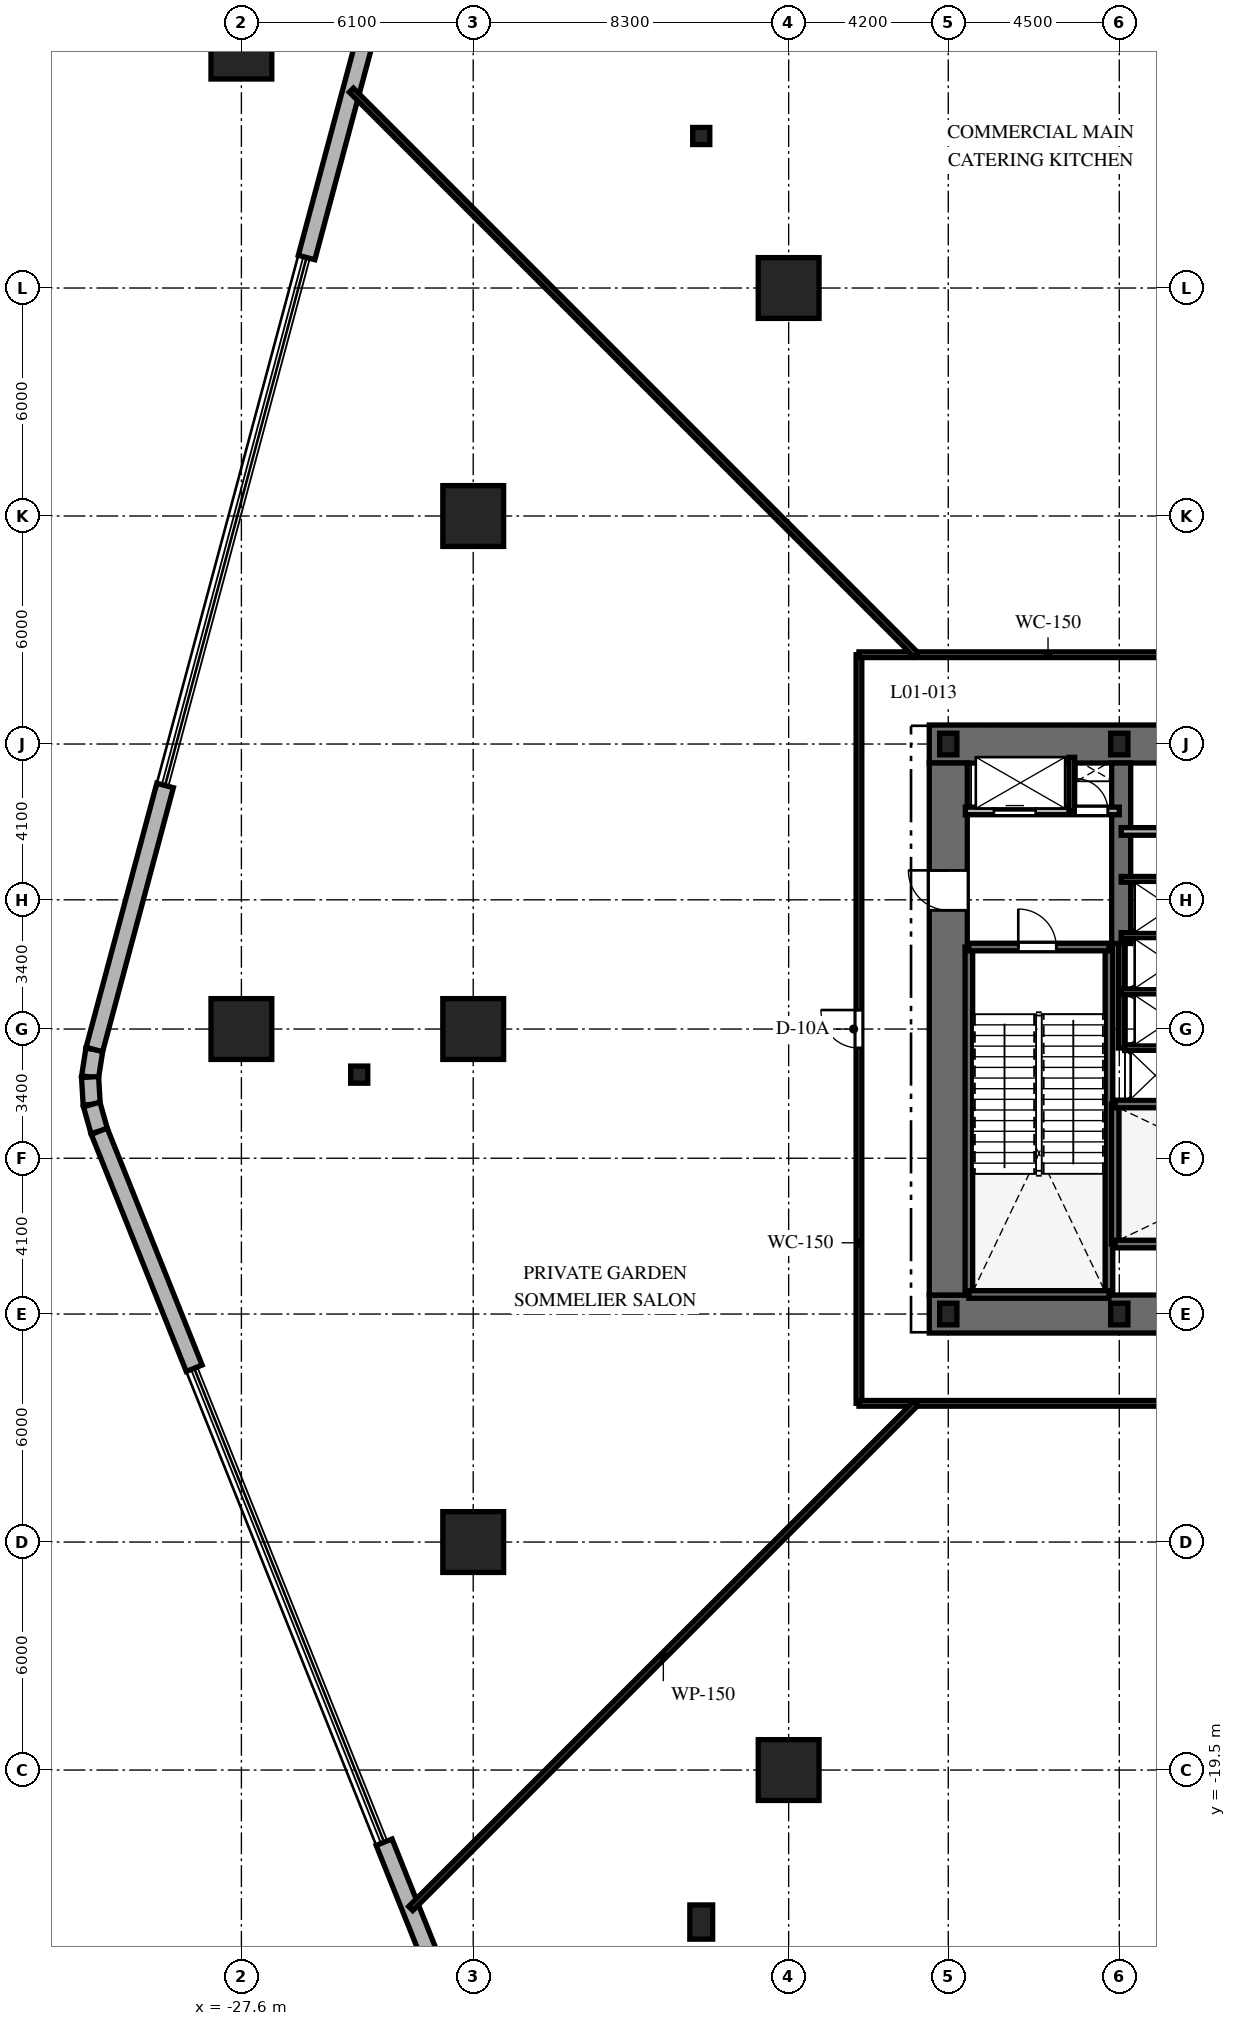
"""IFC4 building model, lengths in metres.
Left out: names, types, materials, properties, quantities, classifications, styles, units other than length and angle.
Written with IfcOpenShell. Run it as: python <this file> out.ifc"""

import sys

from ifc_helpers import new_model, si_unit, direction, frame, frame_2d, origin, origin_2d, place, context, subcontext, project, spatial, rectangle, i_section, extrude, element, fill, save


model = new_model("IFC4")
c1 = context("Model", 3, precision=1e-05, world=origin(), true_north=direction((0.0, 1.0)))
c2 = subcontext(c1, "Body", "Model", "MODEL_VIEW")
j1 = project(units=[si_unit("LENGTHUNIT", "METRE"), si_unit("PLANEANGLEUNIT", "RADIAN")], contexts=[c1])
p1 = place(None, origin())
s1 = spatial("IfcSite", under=j1, at=p1, CompositionType="ELEMENT")
p2 = place(p1, origin())
s2 = spatial("IfcBuilding", under=s1, at=p2, CompositionType="ELEMENT")
p3 = place(p2, frame((0.0, 0.0, 6.0)))
s3 = spatial("IfcBuildingStorey", under=s2, at=p3, CompositionType="ELEMENT", Elevation=6.0)
p4 = place(p3, frame((-9.5, -7.5, 0.0), z_axis=(0.0, 0.0, 1.0), x_axis=(1.0, 0.0, 0.0)))
e1 = element("IfcWall", 1, at=p4, inside=s3, PredefinedType="SHEAR", context=c2, shape_type="SweptSolid", body=[
    extrude(rectangle(XDim=19.0, YDim=1.0, at=frame_2d((9.5, 0.0))), origin(), (0.0, 0.0, 1.0), 5.4),
])
p5 = place(p4, frame((9.55, 0.0, 0.0)))
e2 = element("IfcOpeningElement", 2, at=p5, cuts=e1, PredefinedType="OPENING", context=c2, shape_type="SweptSolid", body=[
    extrude(rectangle(XDim=1.0, YDim=2.15, at=frame_2d((0.5, 1.075))), frame((0.0, 0.51, 0.0), z_axis=(0.0, -1.0, 0.0), x_axis=(1.0, 0.0, 0.0)), (0.0, 0.0, 1.0), 1.02),
])
p6 = place(p3, frame((-9.5, 7.5, 0.0), z_axis=(0.0, 0.0, 1.0), x_axis=(1.0, 0.0, 0.0)))
e3 = element("IfcWall", 3, at=p6, inside=s3, PredefinedType="SHEAR", context=c2, shape_type="SweptSolid", body=[
    extrude(rectangle(XDim=9.55, YDim=1.0, at=frame_2d((4.775, 0.0))), origin(), (0.0, 0.0, 1.0), 5.4),
])
p7 = place(p3, frame((-9.0, -7.0, 0.0), z_axis=(0.0, 0.0, 1.0), x_axis=(0.0, 1.0, 0.0)))
e4 = element("IfcWall", 4, at=p7, inside=s3, PredefinedType="SHEAR", context=c2, shape_type="SweptSolid", body=[
    extrude(rectangle(XDim=14.0, YDim=1.0, at=frame_2d((7.0, 0.0))), origin(), (0.0, 0.0, 1.0), 5.4),
])
p8 = place(p7, frame((10.125, 0.0, 0.0)))
e5 = element("IfcOpeningElement", 5, at=p8, cuts=e4, PredefinedType="OPENING", context=c2, shape_type="SweptSolid", body=[
    extrude(rectangle(XDim=1.05, YDim=2.15, at=frame_2d((0.525, 1.075))), frame((0.0, 0.51, 0.0), z_axis=(0.0, -1.0, 0.0), x_axis=(1.0, 0.0, 0.0)), (0.0, 0.0, 1.0), 1.02),
])
p9 = place(p3, frame((-4.45, 2.25, 0.0), z_axis=(0.0, 0.0, 1.0), x_axis=(0.0, 1.0, 0.0)))
e6 = element("IfcWall", 6, at=p9, inside=s3, PredefinedType="SHEAR", context=c2, shape_type="SweptSolid", body=[
    extrude(rectangle(XDim=4.75, YDim=0.5, at=frame_2d((2.375, 0.0))), origin(), (0.0, 0.0, 1.0), 5.4),
])
for number, where, z_axis, x_axis in (
    (7, (-8.458, -6.985, 0.0), (0.0, 0.0, 1.0), (0.0, 1.0, 0.0)),
    (8, (-4.772, -6.985, 0.0), (0.0, 0.0, 1.0), (0.0, 1.0, 0.0)),
):
    element("IfcWall", number, at=place(p3, frame(where, z_axis=z_axis, x_axis=x_axis)), inside=s3, PredefinedType="SHEAR", context=c2, shape_type="SweptSolid", body=[
        extrude(rectangle(XDim=9.143, YDim=0.2, at=frame_2d((4.572, 0.0))), origin(), (0.0, 0.0, 1.0), 5.4),
    ])
p10 = place(p3, frame((-8.458, -6.985, 0.0), z_axis=(0.0, 0.0, 1.0), x_axis=(1.0, 0.0, 0.0)))
e9 = element("IfcWall", 9, at=p10, inside=s3, PredefinedType="SHEAR", context=c2, shape_type="SweptSolid", body=[
    extrude(rectangle(XDim=3.686, YDim=0.2, at=frame_2d((1.843, 0.0))), origin(), (0.0, 0.0, 1.0), 5.4),
])
p11 = place(p3, frame((-8.458, 2.158, 0.0), z_axis=(0.0, 0.0, 1.0), x_axis=(1.0, 0.0, 0.0)))
e10 = element("IfcWall", 10, at=p11, inside=s3, PredefinedType="SHEAR", context=c2, shape_type="SweptSolid", body=[
    extrude(rectangle(XDim=3.686, YDim=0.2, at=frame_2d((1.843, 0.0))), origin(), (0.0, 0.0, 1.0), 5.4),
])
p12 = place(p11, frame((1.3, 0.0, 0.0)))
e11 = element("IfcOpeningElement", 11, at=p12, cuts=e10, PredefinedType="OPENING", context=c2, shape_type="SweptSolid", body=[
    extrude(rectangle(XDim=1.0, YDim=2.15, at=frame_2d((0.5, 1.075))), frame((0.0, 0.11, 0.0), z_axis=(0.0, -1.0, 0.0), x_axis=(1.0, 0.0, 0.0)), (0.0, 0.0, 1.0), 0.22),
])
p13 = place(p3, frame((-4.608, -5.658, 0.0), z_axis=(0.0, 0.0, 1.0), x_axis=(0.0, 1.0, 0.0)))
e12 = element("IfcWall", 12, at=p13, inside=s3, PredefinedType="SHEAR", context=c2, shape_type="SweptSolid", body=[
    extrude(rectangle(XDim=3.686, YDim=0.2, at=frame_2d((1.843, 0.0))), origin(), (0.0, 0.0, 1.0), 5.4),
])
p14 = place(p3, frame((-4.608, -5.658, 0.0), z_axis=(0.0, 0.0, 1.0), x_axis=(1.0, 0.0, 0.0)))
e13 = element("IfcWall", 13, at=p14, inside=s3, PredefinedType="SHEAR", context=c2, shape_type="SweptSolid", body=[
    extrude(rectangle(XDim=9.166, YDim=0.2, at=frame_2d((4.583, 0.0))), origin(), (0.0, 0.0, 1.0), 5.4),
])
p15 = place(p14, frame((7.45, 0.0, 0.0)))
e14 = element("IfcOpeningElement", 14, at=p15, cuts=e13, PredefinedType="OPENING", context=c2, shape_type="SweptSolid", body=[
    extrude(rectangle(XDim=1.0, YDim=2.15, at=frame_2d((0.5, 1.075))), frame((0.0, 0.11, 0.0), z_axis=(0.0, -1.0, 0.0), x_axis=(1.0, 0.0, 0.0)), (0.0, 0.0, 1.0), 0.22),
])
p16 = place(p3, frame((-4.608, -1.972, 0.0), z_axis=(0.0, 0.0, 1.0), x_axis=(1.0, 0.0, 0.0)))
e15 = element("IfcWall", 15, at=p16, inside=s3, PredefinedType="SHEAR", context=c2, shape_type="SweptSolid", body=[
    extrude(rectangle(XDim=9.166, YDim=0.2, at=frame_2d((4.583, 0.0))), origin(), (0.0, 0.0, 1.0), 5.4),
])
for number, where, z_axis, x_axis in (
    (16, (-9.0, -7.5, 0.0), (0.0, 0.0, 1.0), (1.0, 0.0, 0.0)),
    (17, (-4.5, -7.5, 0.0), (0.0, 0.0, 1.0), (1.0, 0.0, 0.0)),
    (18, (-4.5, 7.5, 0.0), (0.0, 0.0, 1.0), (1.0, 0.0, 0.0)),
    (19, (-9.0, 7.5, 0.0), (0.0, 0.0, 1.0), (1.0, 0.0, 0.0)),
):
    element("IfcColumn", number, at=place(p3, frame(where, z_axis=z_axis, x_axis=x_axis)), inside=s3, PredefinedType="COLUMN", context=c2, shape_type="SweptSolid", body=[
        extrude(i_section(OverallWidth=0.454, OverallDepth=0.569, WebThickness=0.078, FlangeThickness=0.125, at=origin_2d()), origin(), (0.0, 0.0, 1.0), 5.4),
    ])
for number, where, z_axis, x_axis in (
    (20, (-21.5, -13.5, 0.0), (0.0, 0.0, 1.0), (1.0, 0.0, 0.0)),
    (21, (-21.5, 0.0, 0.0), (0.0, 0.0, 1.0), (1.0, 0.0, 0.0)),
    (22, (-21.5, 13.5, 0.0), (0.0, 0.0, 1.0), (1.0, 0.0, 0.0)),
    (23, (-13.2, -19.5, 0.0), (0.0, 0.0, 1.0), (1.0, 0.0, 0.0)),
    (24, (-13.2, 19.5, 0.0), (0.0, 0.0, 1.0), (1.0, 0.0, 0.0)),
    (25, (-27.6, 25.8, 0.0), (0.0, 0.0, 1.0), (1.0, 0.0, 0.0)),
    (26, (-27.6, 0.0, 0.0), (0.0, 0.0, 1.0), (1.0, 0.0, 0.0)),
):
    element("IfcColumn", number, at=place(p3, frame(where, z_axis=z_axis, x_axis=x_axis)), inside=s3, PredefinedType="COLUMN", context=c2, shape_type="SweptSolid", body=[
        extrude(rectangle(XDim=1.6, YDim=1.6, at=origin_2d()), origin(), (0.0, 0.0, 1.0), 5.4),
    ])
p17 = place(p3, frame((-15.5, -23.5, 0.0), z_axis=(0.0, 0.0, 1.0), x_axis=(1.0, 0.0, 0.0)))
e27 = element("IfcColumn", 27, at=p17, inside=s3, PredefinedType="PILASTER", context=c2, shape_type="SweptSolid", body=[
    extrude(rectangle(XDim=0.6, YDim=0.9, at=origin_2d()), origin(), (0.0, 0.0, 1.0), 5.4),
])
for number, where, z_axis, x_axis in (
    (28, (-15.5, 23.5, 0.0), (0.0, 0.0, 1.0), (1.0, 0.0, 0.0)),
    (29, (-24.5, -1.2, 0.0), (0.0, 0.0, 1.0), (1.0, 0.0, 0.0)),
):
    element("IfcColumn", number, at=place(p3, frame(where, z_axis=z_axis, x_axis=x_axis)), inside=s3, PredefinedType="PILASTER", context=c2, shape_type="SweptSolid", body=[
        extrude(rectangle(XDim=0.45, YDim=0.45, at=origin_2d()), origin(), (0.0, 0.0, 1.0), 5.4),
    ])
p18 = place(p3, frame((-31.469, -0.539, 0.0), z_axis=(0.0, 0.0, 1.0), x_axis=(-0.154082468729, -0.988057990621, 0.0)))
e30 = element("IfcWall", 30, at=p18, inside=s3, PredefinedType="SOLIDWALL", context=c2, shape_type="SweptSolid", body=[
    extrude(rectangle(XDim=0.734, YDim=0.45, at=frame_2d((0.367, 0.0))), origin(), (0.0, 0.0, 1.0), 4.05),
])
p19 = place(p3, frame((-31.582, -1.264, 0.0), z_axis=(0.0, 0.0, 1.0), x_axis=(0.059555119752, -0.998225018576, 0.0)))
e31 = element("IfcWall", 31, at=p19, inside=s3, PredefinedType="SOLIDWALL", context=c2, shape_type="SweptSolid", body=[
    extrude(rectangle(XDim=0.721, YDim=0.45, at=frame_2d((0.361, 0.0))), origin(), (0.0, 0.0, 1.0), 4.05),
])
p20 = place(p3, frame((-31.539, -1.984, 0.0), z_axis=(0.0, 0.0, 1.0), x_axis=(0.270543197703, -0.962707836354, 0.0)))
e32 = element("IfcWall", 32, at=p20, inside=s3, PredefinedType="SOLIDWALL", context=c2, shape_type="SweptSolid", body=[
    extrude(rectangle(XDim=0.734, YDim=0.45, at=frame_2d((0.367, 0.0))), origin(), (0.0, 0.0, 1.0), 4.05),
])
p21 = place(p3, frame((-24.024, 27.25, 0.0), z_axis=(0.0, 0.0, 1.0), x_axis=(-0.25880339056, -0.965930020775, 0.0)))
e33 = element("IfcWall", 33, at=p21, inside=s3, PredefinedType="SOLIDWALL", context=c2, shape_type="SweptSolid", body=[
    extrude(rectangle(XDim=7.192, YDim=0.45, at=frame_2d((3.596, 0.0))), origin(), (0.0, 0.0, 1.0), 4.05),
])
p22 = place(p3, frame((-29.608, 6.409, 0.0), z_axis=(0.0, 0.0, 1.0), x_axis=(-0.258786419646, -0.965934567663, 0.0)))
e34 = element("IfcWall", 34, at=p22, inside=s3, PredefinedType="SOLIDWALL", context=c2, shape_type="SweptSolid", body=[
    extrude(rectangle(XDim=7.193, YDim=0.45, at=frame_2d((3.596, 0.0))), origin(), (0.0, 0.0, 1.0), 4.05),
])
p23 = place(p3, frame((-31.341, -2.69, 0.0), z_axis=(0.0, 0.0, 1.0), x_axis=(0.371948252928, -0.928253466002, 0.0)))
e35 = element("IfcWall", 35, at=p23, inside=s3, PredefinedType="SOLIDWALL", context=c2, shape_type="SweptSolid", body=[
    extrude(rectangle(XDim=6.718, YDim=0.45, at=frame_2d((3.359, 0.0))), origin(), (0.0, 0.0, 1.0), 4.05),
])
p24 = place(p3, frame((-23.844, -21.398, 0.0), z_axis=(0.0, 0.0, 1.0), x_axis=(0.37196701808, -0.928245946644, 0.0)))
e36 = element("IfcWall", 36, at=p24, inside=s3, PredefinedType="SOLIDWALL", context=c2, shape_type="SweptSolid", body=[
    extrude(rectangle(XDim=6.719, YDim=0.45, at=frame_2d((3.359, 0.0))), origin(), (0.0, 0.0, 1.0), 4.05),
])
p25 = place(p3, frame((-8.55, 5.74, 0.0), z_axis=(0.0, 0.0, 1.0), x_axis=(1.0, 0.0, 0.0)))
e37 = element("IfcWall", 37, at=p25, inside=s3, PredefinedType="PARTITIONING", context=c2, shape_type="SweptSolid", body=[
    extrude(rectangle(XDim=4.05, YDim=0.2, at=frame_2d((2.025, 0.0))), origin(), (0.0, 0.0, 1.0), 5.08),
])
p26 = place(p25, frame((0.75, 0.0, 0.0)))
e38 = element("IfcOpeningElement", 38, at=p26, cuts=e37, PredefinedType="OPENING", context=c2, shape_type="SweptSolid", body=[
    extrude(rectangle(XDim=1.1, YDim=2.2, at=frame_2d((0.55, 1.1))), frame((0.0, 0.11, 0.0), z_axis=(0.0, -1.0, 0.0), x_axis=(1.0, 0.0, 0.0)), (0.0, 0.0, 1.0), 0.22),
])
p27 = place(p25, frame((2.9, 0.0, 0.0)))
e39 = element("IfcOpeningElement", 39, at=p27, cuts=e37, PredefinedType="OPENING", context=c2, shape_type="SweptSolid", body=[
    extrude(rectangle(XDim=0.85, YDim=2.03, at=frame_2d((0.425, 1.015))), frame((0.0, 0.11, 0.0), z_axis=(0.0, -1.0, 0.0), x_axis=(1.0, 0.0, 0.0)), (0.0, 0.0, 1.0), 0.22),
])
p28 = place(p3, frame((-5.75, 5.74, 0.0), z_axis=(0.0, 0.0, 1.0), x_axis=(0.0, 1.0, 0.0)))
e40 = element("IfcWall", 40, at=p28, inside=s3, PredefinedType="PARTITIONING", context=c2, shape_type="SweptSolid", body=[
    extrude(rectangle(XDim=1.41, YDim=0.15, at=frame_2d((0.705, 0.0))), origin(), (0.0, 0.0, 1.0), 5.08),
])
p29 = place(p3, frame((-4.45, 5.2, 0.0), z_axis=(0.0, 0.0, 1.0), x_axis=(1.0, 0.0, 0.0)))
e41 = element("IfcWall", 41, at=p29, inside=s3, PredefinedType="PARTITIONING", context=c2, shape_type="SweptSolid", body=[
    extrude(rectangle(XDim=4.5, YDim=0.2, at=frame_2d((2.25, 0.0))), origin(), (0.0, 0.0, 1.0), 5.08),
])
p30 = place(p3, frame((-4.45, -0.5, 0.0), z_axis=(0.0, 0.0, 1.0), x_axis=(0.0, 1.0, 0.0)))
e42 = element("IfcWall", 42, at=p30, inside=s3, PredefinedType="PARTITIONING", context=c2, shape_type="SweptSolid", body=[
    extrude(rectangle(XDim=2.75, YDim=0.15, at=frame_2d((1.375, 0.0))), origin(), (0.0, 0.0, 1.0), 5.08),
])
for number, where, z_axis, x_axis in (
    (43, (-4.45, 3.94, 0.0), (0.0, 0.0, 1.0), (1.0, 0.0, 0.0)),
    (44, (-4.45, 0.98, 0.0), (0.0, 0.0, 1.0), (1.0, 0.0, 0.0)),
    (45, (-4.45, 2.46, 0.0), (0.0, 0.0, 1.0), (1.0, 0.0, 0.0)),
):
    element("IfcWall", number, at=place(p3, frame(where, z_axis=z_axis, x_axis=x_axis)), inside=s3, PredefinedType="PARTITIONING", context=c2, shape_type="SweptSolid", body=[
        extrude(rectangle(XDim=2.55, YDim=0.15, at=frame_2d((1.275, 0.0))), origin(), (0.0, 0.0, 1.0), 5.08),
    ])
p31 = place(p3, frame((-4.36, -0.49, 0.0), z_axis=(0.0, 0.0, 1.0), x_axis=(1.0, 0.0, 0.0)))
e46 = element("IfcWall", 46, at=p31, inside=s3, PredefinedType="PARTITIONING", context=c2, shape_type="SweptSolid", body=[
    extrude(rectangle(XDim=8.72, YDim=0.15, at=frame_2d((4.36, 0.0))), origin(), (0.0, 0.0, 1.0), 5.08),
])
p32 = place(p31, frame((3.16, 0.0, 0.0)))
e47 = element("IfcOpeningElement", 47, at=p32, cuts=e46, PredefinedType="OPENING", context=c2, shape_type="SweptSolid", body=[
    extrude(rectangle(XDim=0.85, YDim=2.03, at=frame_2d((0.425, 1.015))), frame((0.0, 0.085, 0.0), z_axis=(0.0, -1.0, 0.0), x_axis=(1.0, 0.0, 0.0)), (0.0, 0.0, 1.0), 0.17),
])
p33 = place(p31, frame((5.21, 0.0, 0.0)))
e48 = element("IfcOpeningElement", 48, at=p33, cuts=e46, PredefinedType="OPENING", context=c2, shape_type="SweptSolid", body=[
    extrude(rectangle(XDim=0.85, YDim=2.03, at=frame_2d((0.425, 1.015))), frame((0.0, 0.085, 0.0), z_axis=(0.0, -1.0, 0.0), x_axis=(1.0, 0.0, 0.0)), (0.0, 0.0, 1.0), 0.17),
])
p34 = place(p3, frame((-11.35, -9.85, 0.0), z_axis=(0.0, 0.0, 1.0), x_axis=(0.0, 1.0, 0.0)))
e49 = element("IfcWall", 49, at=p34, inside=s3, PredefinedType="PARTITIONING", context=c2, shape_type="SweptSolid", body=[
    extrude(rectangle(XDim=19.7, YDim=0.15, at=frame_2d((9.85, 0.0))), origin(), (0.0, 0.0, 1.0), 4.122),
])
p35 = place(p34, frame((9.35, 0.0, 0.0)))
e50 = element("IfcOpeningElement", 50, at=p35, cuts=e49, PredefinedType="OPENING", context=c2, shape_type="SweptSolid", body=[
    extrude(rectangle(XDim=1.0, YDim=2.03, at=frame_2d((0.5, 1.015))), frame((0.0, 0.085, 0.0), z_axis=(0.0, -1.0, 0.0), x_axis=(1.0, 0.0, 0.0)), (0.0, 0.0, 1.0), 0.17),
])
p36 = place(p3, frame((-11.35, 9.85, 0.0), z_axis=(0.0, 0.0, 1.0), x_axis=(1.0, 0.0, 0.0)))
e51 = element("IfcWall", 51, at=p36, inside=s3, PredefinedType="PARTITIONING", context=c2, shape_type="SweptSolid", body=[
    extrude(rectangle(XDim=22.7, YDim=0.15, at=frame_2d((11.35, 0.0))), origin(), (0.0, 0.0, 1.0), 4.122),
])
p37 = place(p36, frame((10.85, 0.0, 0.0)))
e52 = element("IfcOpeningElement", 52, at=p37, cuts=e51, PredefinedType="OPENING", context=c2, shape_type="SweptSolid", body=[
    extrude(rectangle(XDim=1.0, YDim=2.03, at=frame_2d((0.5, 1.015))), frame((0.0, 0.085, 0.0), z_axis=(0.0, -1.0, 0.0), x_axis=(1.0, 0.0, 0.0)), (0.0, 0.0, 1.0), 0.17),
])
p38 = place(p3, frame((11.35, -9.85, 0.0), z_axis=(0.0, 0.0, 1.0), x_axis=(-1.0, 0.0, 0.0)))
e53 = element("IfcWall", 53, at=p38, inside=s3, PredefinedType="PARTITIONING", context=c2, shape_type="SweptSolid", body=[
    extrude(rectangle(XDim=22.7, YDim=0.15, at=frame_2d((11.35, 0.0))), origin(), (0.0, 0.0, 1.0), 4.122),
])
p39 = place(p38, frame((10.45, 0.0, 0.0)))
e54 = element("IfcOpeningElement", 54, at=p39, cuts=e53, PredefinedType="OPENING", context=c2, shape_type="SweptSolid", body=[
    extrude(rectangle(XDim=1.8, YDim=2.2, at=frame_2d((0.9, 1.1))), frame((0.0, 0.085, 0.0), z_axis=(0.0, -1.0, 0.0), x_axis=(1.0, 0.0, 0.0)), (0.0, 0.0, 1.0), 0.17),
])
p40 = place(p3, frame((-9.85, -9.85, 0.0), z_axis=(0.0, 0.0, 1.0), x_axis=(-0.707106781187, -0.707106781187, 0.0)))
e55 = element("IfcWall", 55, at=p40, inside=s3, PredefinedType="PARTITIONING", context=c2, shape_type="SweptSolid", body=[
    extrude(rectangle(XDim=18.801, YDim=0.15, at=frame_2d((9.401, 0.0))), origin(), (0.0, 0.0, 1.0), 4.214),
])
p41 = place(p3, frame((-9.85, 9.85, 0.0), z_axis=(0.0, 0.0, 1.0), x_axis=(-0.707106781187, 0.707106781187, 0.0)))
e56 = element("IfcWall", 56, at=p41, inside=s3, PredefinedType="PARTITIONING", context=c2, shape_type="SweptSolid", body=[
    extrude(rectangle(XDim=21.009, YDim=0.15, at=frame_2d((10.504, 0.0))), origin(), (0.0, 0.0, 1.0), 4.07),
])
p42 = place(p12, origin())
e57 = element("IfcDoor", 57, at=p42, inside=s3, OperationType="SINGLE_SWING_LEFT", PredefinedType="DOOR", context=c2, shape_type="SweptSolid", body=[
    extrude(rectangle(XDim=1.0, YDim=2.15, at=frame_2d((0.5, 1.075))), frame((0.0, 0.025, 0.0), z_axis=(0.0, -1.0, 0.0), x_axis=(1.0, 0.0, 0.0)), (0.0, 0.0, 1.0), 0.05),
])
fill(e11, e57)
p43 = place(p8, origin())
e58 = element("IfcDoor", 58, at=p43, inside=s3, OperationType="SINGLE_SWING_RIGHT", PredefinedType="DOOR", context=c2, shape_type="SweptSolid", body=[
    extrude(rectangle(XDim=1.05, YDim=2.15, at=frame_2d((0.525, 1.075))), frame((0.0, 0.025, 0.0), z_axis=(0.0, -1.0, 0.0), x_axis=(1.0, 0.0, 0.0)), (0.0, 0.0, 1.0), 0.05),
])
fill(e5, e58)
p44 = place(p26, origin())
e59 = element("IfcDoor", 59, at=p44, inside=s3, OperationType="SLIDING_TO_LEFT", PredefinedType="DOOR", context=c2, shape_type="SweptSolid", body=[
    extrude(rectangle(XDim=1.1, YDim=2.2, at=frame_2d((0.55, 1.1))), frame((0.0, 0.025, 0.0), z_axis=(0.0, -1.0, 0.0), x_axis=(1.0, 0.0, 0.0)), (0.0, 0.0, 1.0), 0.05),
])
fill(e38, e59)
p45 = place(p27, origin())
e60 = element("IfcDoor", 60, at=p45, inside=s3, OperationType="SINGLE_SWING_LEFT", PredefinedType="DOOR", context=c2, shape_type="SweptSolid", body=[
    extrude(rectangle(XDim=0.85, YDim=2.03, at=frame_2d((0.425, 1.015))), frame((0.0, 0.025, 0.0), z_axis=(0.0, -1.0, 0.0), x_axis=(1.0, 0.0, 0.0)), (0.0, 0.0, 1.0), 0.05),
])
fill(e39, e60)
p46 = place(p35, origin())
e61 = element("IfcDoor", 61, at=p46, inside=s3, OperationType="SINGLE_SWING_RIGHT", PredefinedType="DOOR", context=c2, shape_type="SweptSolid", body=[
    extrude(rectangle(XDim=1.0, YDim=2.03, at=frame_2d((0.5, 1.015))), frame((0.0, 0.025, 0.0), z_axis=(0.0, -1.0, 0.0), x_axis=(1.0, 0.0, 0.0)), (0.0, 0.0, 1.0), 0.05),
])
fill(e50, e61)
save(model, sys.argv[1])
